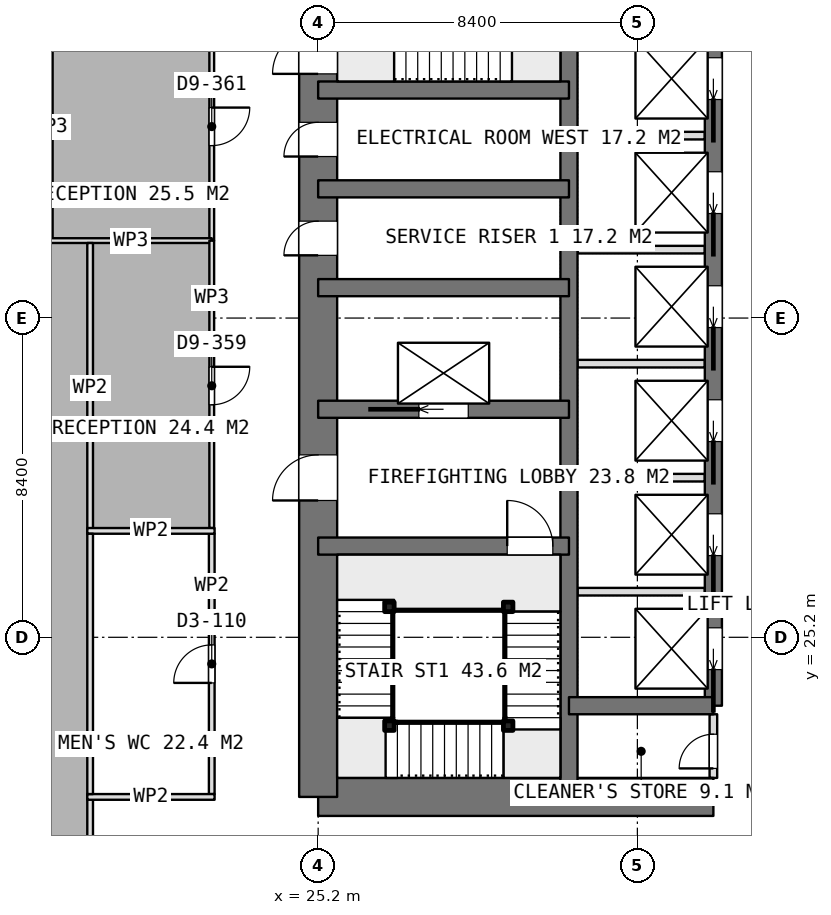
"""IFC4 building model, lengths in metres.
Left out: names, types, materials, properties, quantities, classifications, styles, units other than length and angle.
Written with IfcOpenShell. Run it as: python <this file> out.ifc"""

import sys

from ifc_helpers import new_model, si_unit, direction, frame, frame_2d, origin, origin_2d, place, context, subcontext, project, spatial, rectangle, extrude, element, fill, save


model = new_model("IFC4")
c1 = context("Model", 3, precision=1e-05, world=origin(), true_north=direction((0.0, 1.0)))
c2 = subcontext(c1, "Body", "Model", "MODEL_VIEW")
j1 = project(units=[si_unit("LENGTHUNIT", "METRE"), si_unit("PLANEANGLEUNIT", "RADIAN")], contexts=[c1])
p1 = place(None, origin())
s1 = spatial("IfcSite", under=j1, at=p1, CompositionType="ELEMENT")
p2 = place(p1, origin())
s2 = spatial("IfcBuilding", under=s1, at=p2, CompositionType="ELEMENT")
p3 = place(p2, frame((0.0, 0.0, 106.55)))
s3 = spatial("IfcBuildingStorey", under=s2, at=p3, CompositionType="ELEMENT", Elevation=106.55)
p4 = place(p3, frame((25.2, 21.0, 0.0), z_axis=(0.0, 0.0, 1.0), x_axis=(1.0, 0.0, 0.0)))
e1 = element("IfcWall", 1, at=p4, inside=s3, PredefinedType="SHEAR", context=c2, shape_type="SweptSolid", body=[
    extrude(rectangle(XDim=10.4, YDim=1.0, at=frame_2d((5.2, 0.0))), origin(), (0.0, 0.0, 1.0), 3.75),
])
p5 = place(p3, frame((25.2, 21.0, 0.0), z_axis=(0.0, 0.0, 1.0), x_axis=(0.0, 1.0, 0.0)))
e2 = element("IfcWall", 2, at=p5, inside=s3, PredefinedType="SHEAR", context=c2, shape_type="SweptSolid", body=[
    extrude(rectangle(XDim=25.2, YDim=1.0, at=frame_2d((12.6, 0.0))), origin(), (0.0, 0.0, 1.0), 3.75),
])
p6 = place(p5, frame((7.8, 0.0, 0.0)))
e3 = element("IfcOpeningElement", 3, at=p6, cuts=e2, PredefinedType="OPENING", context=c2, shape_type="SweptSolid", body=[
    extrude(rectangle(XDim=1.2, YDim=2.1, at=frame_2d((0.6, 1.05))), frame((0.0, 0.51, 0.0), z_axis=(0.0, -1.0, 0.0), x_axis=(1.0, 0.0, 0.0)), (0.0, 0.0, 1.0), 1.02),
])
p7 = place(p5, frame((14.25, 0.0, 0.0)))
e4 = element("IfcOpeningElement", 4, at=p7, cuts=e2, PredefinedType="OPENING", context=c2, shape_type="SweptSolid", body=[
    extrude(rectangle(XDim=0.9, YDim=2.1, at=frame_2d((0.45, 1.05))), frame((0.0, 0.51, 0.0), z_axis=(0.0, -1.0, 0.0), x_axis=(1.0, 0.0, 0.0)), (0.0, 0.0, 1.0), 1.02),
])
p8 = place(p5, frame((16.85, 0.0, 0.0)))
e5 = element("IfcOpeningElement", 5, at=p8, cuts=e2, PredefinedType="OPENING", context=c2, shape_type="SweptSolid", body=[
    extrude(rectangle(XDim=0.9, YDim=2.1, at=frame_2d((0.45, 1.05))), frame((0.0, 0.51, 0.0), z_axis=(0.0, -1.0, 0.0), x_axis=(1.0, 0.0, 0.0)), (0.0, 0.0, 1.0), 1.02),
])
p9 = place(p5, frame((19.025, 0.0, 0.0)))
e6 = element("IfcOpeningElement", 6, at=p9, cuts=e2, PredefinedType="OPENING", context=c2, shape_type="SweptSolid", body=[
    extrude(rectangle(XDim=1.2, YDim=2.1, at=frame_2d((0.6, 1.05))), frame((0.0, 0.51, 0.0), z_axis=(0.0, -1.0, 0.0), x_axis=(1.0, 0.0, 0.0)), (0.0, 0.0, 1.0), 1.02),
])
p10 = place(p3, frame((31.8, 21.0, 0.0), z_axis=(0.0, 0.0, 1.0), x_axis=(0.0, 1.0, 0.0)))
e7 = element("IfcWall", 7, at=p10, inside=s3, PredefinedType="SHEAR", context=c2, shape_type="SweptSolid", body=[
    extrude(rectangle(XDim=25.2, YDim=0.45, at=frame_2d((12.6, 0.0))), origin(), (0.0, 0.0, 1.0), 3.75),
])
p11 = place(p3, frame((35.6, 23.4, 0.0), z_axis=(0.0, 0.0, 1.0), x_axis=(0.0, 1.0, 0.0)))
e8 = element("IfcWall", 8, at=p11, inside=s3, PredefinedType="SHEAR", context=c2, shape_type="SweptSolid", body=[
    extrude(rectangle(XDim=18.0, YDim=0.45, at=frame_2d((9.0, 0.0))), origin(), (0.0, 0.0, 1.0), 3.75),
])
p12 = place(p11, frame((0.95, 0.0, 0.0)))
e9 = element("IfcOpeningElement", 9, at=p12, cuts=e8, PredefinedType="OPENING", context=c2, shape_type="SweptSolid", body=[
    extrude(rectangle(XDim=1.1, YDim=2.1, at=frame_2d((0.55, 1.05))), frame((0.0, 0.235, 0.0), z_axis=(0.0, -1.0, 0.0), x_axis=(1.0, 0.0, 0.0)), (0.0, 0.0, 1.0), 0.47),
])
p13 = place(p11, frame((3.95, 0.0, 0.0)))
e10 = element("IfcOpeningElement", 10, at=p13, cuts=e8, PredefinedType="OPENING", context=c2, shape_type="SweptSolid", body=[
    extrude(rectangle(XDim=1.1, YDim=2.1, at=frame_2d((0.55, 1.05))), frame((0.0, 0.235, 0.0), z_axis=(0.0, -1.0, 0.0), x_axis=(1.0, 0.0, 0.0)), (0.0, 0.0, 1.0), 0.47),
])
p14 = place(p11, frame((6.95, 0.0, 0.0)))
e11 = element("IfcOpeningElement", 11, at=p14, cuts=e8, PredefinedType="OPENING", context=c2, shape_type="SweptSolid", body=[
    extrude(rectangle(XDim=1.1, YDim=2.1, at=frame_2d((0.55, 1.05))), frame((0.0, 0.235, 0.0), z_axis=(0.0, -1.0, 0.0), x_axis=(1.0, 0.0, 0.0)), (0.0, 0.0, 1.0), 0.47),
])
p15 = place(p11, frame((9.95, 0.0, 0.0)))
e12 = element("IfcOpeningElement", 12, at=p15, cuts=e8, PredefinedType="OPENING", context=c2, shape_type="SweptSolid", body=[
    extrude(rectangle(XDim=1.1, YDim=2.1, at=frame_2d((0.55, 1.05))), frame((0.0, 0.235, 0.0), z_axis=(0.0, -1.0, 0.0), x_axis=(1.0, 0.0, 0.0)), (0.0, 0.0, 1.0), 0.47),
])
p16 = place(p11, frame((12.95, 0.0, 0.0)))
e13 = element("IfcOpeningElement", 13, at=p16, cuts=e8, PredefinedType="OPENING", context=c2, shape_type="SweptSolid", body=[
    extrude(rectangle(XDim=1.1, YDim=2.1, at=frame_2d((0.55, 1.05))), frame((0.0, 0.235, 0.0), z_axis=(0.0, -1.0, 0.0), x_axis=(1.0, 0.0, 0.0)), (0.0, 0.0, 1.0), 0.47),
])
p17 = place(p11, frame((15.95, 0.0, 0.0)))
e14 = element("IfcOpeningElement", 14, at=p17, cuts=e8, PredefinedType="OPENING", context=c2, shape_type="SweptSolid", body=[
    extrude(rectangle(XDim=1.1, YDim=2.1, at=frame_2d((0.55, 1.05))), frame((0.0, 0.235, 0.0), z_axis=(0.0, -1.0, 0.0), x_axis=(1.0, 0.0, 0.0)), (0.0, 0.0, 1.0), 0.47),
])
p18 = place(p3, frame((31.8, 23.4, 0.0), z_axis=(0.0, 0.0, 1.0), x_axis=(1.0, 0.0, 0.0)))
e15 = element("IfcWall", 15, at=p18, inside=s3, PredefinedType="SHEAR", context=c2, shape_type="SweptSolid", body=[
    extrude(rectangle(XDim=3.8, YDim=0.45, at=frame_2d((1.9, 0.0))), origin(), (0.0, 0.0, 1.0), 3.75),
])
p19 = place(p3, frame((25.2, 27.6, 0.0), z_axis=(0.0, 0.0, 1.0), x_axis=(1.0, 0.0, 0.0)))
e16 = element("IfcWall", 16, at=p19, inside=s3, PredefinedType="SHEAR", context=c2, shape_type="SweptSolid", body=[
    extrude(rectangle(XDim=6.6, YDim=0.45, at=frame_2d((3.3, 0.0))), origin(), (0.0, 0.0, 1.0), 3.75),
])
p20 = place(p19, frame((4.975, 0.0, 0.0)))
e17 = element("IfcOpeningElement", 17, at=p20, cuts=e16, PredefinedType="OPENING", context=c2, shape_type="SweptSolid", body=[
    extrude(rectangle(XDim=1.2, YDim=2.1, at=frame_2d((0.6, 1.05))), frame((0.0, 0.235, 0.0), z_axis=(0.0, -1.0, 0.0), x_axis=(1.0, 0.0, 0.0)), (0.0, 0.0, 1.0), 0.47),
])
p21 = place(p3, frame((25.2, 31.2, 0.0), z_axis=(0.0, 0.0, 1.0), x_axis=(1.0, 0.0, 0.0)))
e18 = element("IfcWall", 18, at=p21, inside=s3, PredefinedType="SHEAR", context=c2, shape_type="SweptSolid", body=[
    extrude(rectangle(XDim=6.6, YDim=0.45, at=frame_2d((3.3, 0.0))), origin(), (0.0, 0.0, 1.0), 3.75),
])
p22 = place(p21, frame((2.65, 0.0, 0.0)))
e19 = element("IfcOpeningElement", 19, at=p22, cuts=e18, PredefinedType="OPENING", context=c2, shape_type="SweptSolid", body=[
    extrude(rectangle(XDim=1.3, YDim=2.1, at=frame_2d((0.65, 1.05))), frame((0.0, 0.235, 0.0), z_axis=(0.0, -1.0, 0.0), x_axis=(1.0, 0.0, 0.0)), (0.0, 0.0, 1.0), 0.47),
])
for number, where, z_axis, x_axis in (
    (20, (25.2, 34.4, 0.0), (0.0, 0.0, 1.0), (1.0, 0.0, 0.0)),
    (21, (25.2, 37.0, 0.0), (0.0, 0.0, 1.0), (1.0, 0.0, 0.0)),
    (22, (25.2, 39.6, 0.0), (0.0, 0.0, 1.0), (1.0, 0.0, 0.0)),
):
    element("IfcWall", number, at=place(p3, frame(where, z_axis=z_axis, x_axis=x_axis)), inside=s3, PredefinedType="SHEAR", context=c2, shape_type="SweptSolid", body=[
        extrude(rectangle(XDim=6.6, YDim=0.45, at=frame_2d((3.3, 0.0))), origin(), (0.0, 0.0, 1.0), 3.75),
    ])
for number, where, z_axis, x_axis in (
    (23, (32.025, 26.4, 0.0), (0.0, 0.0, 1.0), (1.0, 0.0, 0.0)),
    (24, (32.025, 29.4, 0.0), (0.0, 0.0, 1.0), (1.0, 0.0, 0.0)),
    (25, (32.025, 32.4, 0.0), (0.0, 0.0, 1.0), (1.0, 0.0, 0.0)),
    (26, (32.025, 35.4, 0.0), (0.0, 0.0, 1.0), (1.0, 0.0, 0.0)),
    (27, (32.025, 38.4, 0.0), (0.0, 0.0, 1.0), (1.0, 0.0, 0.0)),
):
    element("IfcWall", number, at=place(p3, frame(where, z_axis=z_axis, x_axis=x_axis)), inside=s3, PredefinedType="PARTITIONING", context=c2, shape_type="SweptSolid", body=[
        extrude(rectangle(XDim=3.35, YDim=0.2, at=frame_2d((1.675, 0.0))), origin(), (0.0, 0.0, 1.0), 3.5),
    ])
p23 = place(p3, frame((35.6, 21.5, 0.0), z_axis=(0.0, 0.0, 1.0), x_axis=(0.0, 1.0, 0.0)))
e28 = element("IfcWall", 28, at=p23, inside=s3, PredefinedType="PARTITIONING", context=c2, shape_type="SweptSolid", body=[
    extrude(rectangle(XDim=1.675, YDim=0.2, at=frame_2d((0.837, 0.0))), origin(), (0.0, 0.0, 1.0), 3.5),
])
p24 = place(p23, frame((0.25, 0.0, 0.0)))
e29 = element("IfcOpeningElement", 29, at=p24, cuts=e28, PredefinedType="OPENING", context=c2, shape_type="SweptSolid", body=[
    extrude(rectangle(XDim=0.9, YDim=2.1, at=frame_2d((0.45, 1.05))), frame((0.0, 0.11, 0.0), z_axis=(0.0, -1.0, 0.0), x_axis=(1.0, 0.0, 0.0)), (0.0, 0.0, 1.0), 0.22),
])
for number, where, z_axis, x_axis in (
    (30, (19.125, 21.0, 0.0), (0.0, 0.0, 1.0), (1.0, 0.0, 0.0)),
    (31, (19.125, 28.0, 0.0), (0.0, 0.0, 1.0), (1.0, 0.0, 0.0)),
):
    element("IfcWall", number, at=place(p3, frame(where, z_axis=z_axis, x_axis=x_axis)), inside=s3, PredefinedType="PARTITIONING", context=c2, shape_type="SweptSolid", body=[
        extrude(rectangle(XDim=3.35, YDim=0.15, at=frame_2d((1.675, 0.0))), origin(), (0.0, 0.0, 1.0), 3.5),
    ])
p25 = place(p3, frame((19.2, 21.075, 0.0), z_axis=(0.0, 0.0, 1.0), x_axis=(0.0, 1.0, 0.0)))
e32 = element("IfcWall", 32, at=p25, inside=s3, PredefinedType="PARTITIONING", context=c2, shape_type="SweptSolid", body=[
    extrude(rectangle(XDim=6.85, YDim=0.15, at=frame_2d((3.425, 0.0))), origin(), (0.0, 0.0, 1.0), 3.5),
])
p26 = place(p3, frame((22.4, 21.075, 0.0), z_axis=(0.0, 0.0, 1.0), x_axis=(0.0, 1.0, 0.0)))
e33 = element("IfcWall", 33, at=p26, inside=s3, PredefinedType="PARTITIONING", context=c2, shape_type="SweptSolid", body=[
    extrude(rectangle(XDim=6.85, YDim=0.15, at=frame_2d((3.425, 0.0))), origin(), (0.0, 0.0, 1.0), 3.5),
])
p27 = place(p26, frame((2.925, 0.0, 0.0)))
e34 = element("IfcOpeningElement", 34, at=p27, cuts=e33, PredefinedType="OPENING", context=c2, shape_type="SweptSolid", body=[
    extrude(rectangle(XDim=1.0, YDim=2.1, at=frame_2d((0.5, 1.05))), frame((0.0, 0.085, 0.0), z_axis=(0.0, -1.0, 0.0), x_axis=(1.0, 0.0, 0.0)), (0.0, 0.0, 1.0), 0.17),
])
p28 = place(p3, frame((18.15, 35.638, 0.0), z_axis=(0.0, 0.0, 1.0), x_axis=(0.0, 1.0, 0.0)))
e35 = element("IfcWall", 35, at=p28, inside=s3, PredefinedType="PARTITIONING", context=c2, shape_type="SweptSolid", body=[
    extrude(rectangle(XDim=5.999, YDim=0.125, at=frame_2d((3.0, 0.0))), origin(), (0.0, 0.0, 1.0), 3.5),
])
p29 = place(p3, frame((22.4, 41.637, 0.0), z_axis=(0.0, 0.0, 1.0), x_axis=(0.0, -1.0, 0.0)))
e36 = element("IfcWall", 36, at=p29, inside=s3, PredefinedType="PARTITIONING", context=c2, shape_type="SweptSolid", body=[
    extrude(rectangle(XDim=5.999, YDim=0.125, at=frame_2d((3.0, 0.0))), origin(), (0.0, 0.0, 1.0), 3.5),
])
p30 = place(p29, frame((2.499, 0.0, 0.0)))
e37 = element("IfcOpeningElement", 37, at=p30, cuts=e36, PredefinedType="OPENING", context=c2, shape_type="SweptSolid", body=[
    extrude(rectangle(XDim=1.0, YDim=2.1, at=frame_2d((0.5, 1.05))), frame((0.0, 0.073, 0.0), z_axis=(0.0, -1.0, 0.0), x_axis=(1.0, 0.0, 0.0)), (0.0, 0.0, 1.0), 0.145),
])
p31 = place(p3, frame((22.4, 35.638, 0.0), z_axis=(0.0, 0.0, 1.0), x_axis=(-1.0, 0.0, 0.0)))
e38 = element("IfcWall", 38, at=p31, inside=s3, PredefinedType="PARTITIONING", context=c2, shape_type="SweptSolid", body=[
    extrude(rectangle(XDim=4.25, YDim=0.125, at=frame_2d((2.125, 0.0))), origin(), (0.0, 0.0, 1.0), 3.5),
])
p32 = place(p3, frame((19.2, 35.575, 0.0), z_axis=(0.0, 0.0, 1.0), x_axis=(0.0, -1.0, 0.0)))
e39 = element("IfcWall", 39, at=p32, inside=s3, PredefinedType="PARTITIONING", context=c2, shape_type="SweptSolid", body=[
    extrude(rectangle(XDim=7.65, YDim=0.15, at=frame_2d((3.825, 0.0))), origin(), (0.0, 0.0, 1.0), 3.5),
])
p33 = place(p3, frame((19.2, 21.075, 0.0), z_axis=(0.0, 0.0, 1.0), x_axis=(0.0, -1.0, 0.0)))
e40 = element("IfcWall", 40, at=p33, inside=s3, PredefinedType="PARTITIONING", context=c2, shape_type="SweptSolid", body=[
    extrude(rectangle(XDim=1.636, YDim=0.15, at=frame_2d((0.818, 0.0))), origin(), (0.0, 0.0, 1.0), 3.5),
])
p34 = place(p3, frame((22.4, 35.637, 0.0), z_axis=(0.0, 0.0, 1.0), x_axis=(0.0, -1.0, 0.0)))
e41 = element("IfcWall", 41, at=p34, inside=s3, PredefinedType="PARTITIONING", context=c2, shape_type="SweptSolid", body=[
    extrude(rectangle(XDim=7.562, YDim=0.125, at=frame_2d((3.781, 0.0))), origin(), (0.0, 0.0, 1.0), 3.5),
])
p35 = place(p34, frame((3.319, 0.0, 0.0)))
e42 = element("IfcOpeningElement", 42, at=p35, cuts=e41, PredefinedType="OPENING", context=c2, shape_type="SweptSolid", body=[
    extrude(rectangle(XDim=1.0, YDim=2.1, at=frame_2d((0.5, 1.05))), frame((0.0, 0.073, 0.0), z_axis=(0.0, -1.0, 0.0), x_axis=(1.0, 0.0, 0.0)), (0.0, 0.0, 1.0), 0.145),
])
for number, where, z_axis, x_axis in (
    (43, (30.2, 26.0, 0.0), (0.0, 0.0, 1.0), (1.0, 0.0, 0.0)),
    (44, (30.2, 22.875, 0.0), (0.0, 0.0, 1.0), (1.0, 0.0, 0.0)),
    (45, (27.075, 22.875, 0.0), (0.0, 0.0, 1.0), (1.0, 0.0, 0.0)),
    (46, (27.075, 26.0, 0.0), (0.0, 0.0, 1.0), (1.0, 0.0, 0.0)),
):
    element("IfcColumn", number, at=place(p3, frame(where, z_axis=z_axis, x_axis=x_axis)), inside=s3, PredefinedType="COLUMN", context=c2, shape_type="SweptSolid", body=[
        extrude(rectangle(XDim=0.25, YDim=0.25, at=origin_2d()), origin(), (0.0, 0.0, 1.0), 3.75),
    ])
p36 = place(p6, origin())
e47 = element("IfcDoor", 47, at=p36, inside=s3, OperationType="SINGLE_SWING_LEFT", PredefinedType="DOOR", context=c2, shape_type="SweptSolid", body=[
    extrude(rectangle(XDim=1.2, YDim=2.1, at=frame_2d((0.6, 1.05))), frame((0.0, 0.025, 0.0), z_axis=(0.0, -1.0, 0.0), x_axis=(1.0, 0.0, 0.0)), (0.0, 0.0, 1.0), 0.05),
])
fill(e3, e47)
p37 = place(p7, origin())
e48 = element("IfcDoor", 48, at=p37, inside=s3, OperationType="SINGLE_SWING_LEFT", PredefinedType="DOOR", context=c2, shape_type="SweptSolid", body=[
    extrude(rectangle(XDim=0.9, YDim=2.1, at=frame_2d((0.45, 1.05))), frame((0.0, 0.025, 0.0), z_axis=(0.0, -1.0, 0.0), x_axis=(1.0, 0.0, 0.0)), (0.0, 0.0, 1.0), 0.05),
])
fill(e4, e48)
p38 = place(p8, origin())
e49 = element("IfcDoor", 49, at=p38, inside=s3, OperationType="SINGLE_SWING_LEFT", PredefinedType="DOOR", context=c2, shape_type="SweptSolid", body=[
    extrude(rectangle(XDim=0.9, YDim=2.1, at=frame_2d((0.45, 1.05))), frame((0.0, 0.025, 0.0), z_axis=(0.0, -1.0, 0.0), x_axis=(1.0, 0.0, 0.0)), (0.0, 0.0, 1.0), 0.05),
])
fill(e5, e49)
p39 = place(p24, origin())
e50 = element("IfcDoor", 50, at=p39, inside=s3, OperationType="SINGLE_SWING_LEFT", PredefinedType="DOOR", context=c2, shape_type="SweptSolid", body=[
    extrude(rectangle(XDim=0.9, YDim=2.1, at=frame_2d((0.45, 1.05))), frame((0.0, 0.025, 0.0), z_axis=(0.0, -1.0, 0.0), x_axis=(1.0, 0.0, 0.0)), (0.0, 0.0, 1.0), 0.05),
])
fill(e29, e50)
p40 = place(p12, origin())
e51 = element("IfcDoor", 51, at=p40, inside=s3, OperationType="SLIDING_TO_LEFT", PredefinedType="USERDEFINED", context=c2, shape_type="SweptSolid", body=[
    extrude(rectangle(XDim=1.1, YDim=2.1, at=frame_2d((0.55, 1.05))), frame((0.0, 0.025, 0.0), z_axis=(0.0, -1.0, 0.0), x_axis=(1.0, 0.0, 0.0)), (0.0, 0.0, 1.0), 0.05),
])
fill(e9, e51)
p41 = place(p13, origin())
e52 = element("IfcDoor", 52, at=p41, inside=s3, OperationType="SLIDING_TO_LEFT", PredefinedType="USERDEFINED", context=c2, shape_type="SweptSolid", body=[
    extrude(rectangle(XDim=1.1, YDim=2.1, at=frame_2d((0.55, 1.05))), frame((0.0, 0.025, 0.0), z_axis=(0.0, -1.0, 0.0), x_axis=(1.0, 0.0, 0.0)), (0.0, 0.0, 1.0), 0.05),
])
fill(e10, e52)
p42 = place(p14, origin())
e53 = element("IfcDoor", 53, at=p42, inside=s3, OperationType="SLIDING_TO_LEFT", PredefinedType="USERDEFINED", context=c2, shape_type="SweptSolid", body=[
    extrude(rectangle(XDim=1.1, YDim=2.1, at=frame_2d((0.55, 1.05))), frame((0.0, 0.025, 0.0), z_axis=(0.0, -1.0, 0.0), x_axis=(1.0, 0.0, 0.0)), (0.0, 0.0, 1.0), 0.05),
])
fill(e11, e53)
p43 = place(p15, origin())
e54 = element("IfcDoor", 54, at=p43, inside=s3, OperationType="SLIDING_TO_LEFT", PredefinedType="USERDEFINED", context=c2, shape_type="SweptSolid", body=[
    extrude(rectangle(XDim=1.1, YDim=2.1, at=frame_2d((0.55, 1.05))), frame((0.0, 0.025, 0.0), z_axis=(0.0, -1.0, 0.0), x_axis=(1.0, 0.0, 0.0)), (0.0, 0.0, 1.0), 0.05),
])
fill(e12, e54)
p44 = place(p16, origin())
e55 = element("IfcDoor", 55, at=p44, inside=s3, OperationType="SLIDING_TO_LEFT", PredefinedType="USERDEFINED", context=c2, shape_type="SweptSolid", body=[
    extrude(rectangle(XDim=1.1, YDim=2.1, at=frame_2d((0.55, 1.05))), frame((0.0, 0.025, 0.0), z_axis=(0.0, -1.0, 0.0), x_axis=(1.0, 0.0, 0.0)), (0.0, 0.0, 1.0), 0.05),
])
fill(e13, e55)
p45 = place(p17, origin())
e56 = element("IfcDoor", 56, at=p45, inside=s3, OperationType="SLIDING_TO_LEFT", PredefinedType="USERDEFINED", context=c2, shape_type="SweptSolid", body=[
    extrude(rectangle(XDim=1.1, YDim=2.1, at=frame_2d((0.55, 1.05))), frame((0.0, 0.025, 0.0), z_axis=(0.0, -1.0, 0.0), x_axis=(1.0, 0.0, 0.0)), (0.0, 0.0, 1.0), 0.05),
])
fill(e14, e56)
p46 = place(p22, origin())
e57 = element("IfcDoor", 57, at=p46, inside=s3, OperationType="SLIDING_TO_LEFT", PredefinedType="USERDEFINED", context=c2, shape_type="SweptSolid", body=[
    extrude(rectangle(XDim=1.3, YDim=2.1, at=frame_2d((0.65, 1.05))), frame((0.0, 0.025, 0.0), z_axis=(0.0, -1.0, 0.0), x_axis=(1.0, 0.0, 0.0)), (0.0, 0.0, 1.0), 0.05),
])
fill(e19, e57)
p47 = place(p27, origin())
e58 = element("IfcDoor", 58, at=p47, inside=s3, OperationType="SINGLE_SWING_LEFT", PredefinedType="DOOR", context=c2, shape_type="SweptSolid", body=[
    extrude(rectangle(XDim=1.0, YDim=2.1, at=frame_2d((0.5, 1.05))), frame((0.0, 0.025, 0.0), z_axis=(0.0, -1.0, 0.0), x_axis=(1.0, 0.0, 0.0)), (0.0, 0.0, 1.0), 0.05),
])
fill(e34, e58)
p48 = place(p30, origin())
e59 = element("IfcDoor", 59, at=p48, inside=s3, OperationType="SINGLE_SWING_LEFT", PredefinedType="DOOR", context=c2, shape_type="SweptSolid", body=[
    extrude(rectangle(XDim=1.0, YDim=2.1, at=frame_2d((0.5, 1.05))), frame((0.0, 0.025, 0.0), z_axis=(0.0, -1.0, 0.0), x_axis=(1.0, 0.0, 0.0)), (0.0, 0.0, 1.0), 0.05),
])
fill(e37, e59)
p49 = place(p35, origin())
e60 = element("IfcDoor", 60, at=p49, inside=s3, OperationType="SINGLE_SWING_LEFT", PredefinedType="DOOR", context=c2, shape_type="SweptSolid", body=[
    extrude(rectangle(XDim=1.0, YDim=2.1, at=frame_2d((0.5, 1.05))), frame((0.0, 0.025, 0.0), z_axis=(0.0, -1.0, 0.0), x_axis=(1.0, 0.0, 0.0)), (0.0, 0.0, 1.0), 0.05),
])
fill(e42, e60)
p50 = place(p20, origin())
e61 = element("IfcDoor", 61, at=p50, inside=s3, OperationType="SINGLE_SWING_RIGHT", PredefinedType="DOOR", context=c2, shape_type="SweptSolid", body=[
    extrude(rectangle(XDim=1.2, YDim=2.1, at=frame_2d((0.6, 1.05))), frame((0.0, 0.025, 0.0), z_axis=(0.0, -1.0, 0.0), x_axis=(1.0, 0.0, 0.0)), (0.0, 0.0, 1.0), 0.05),
])
fill(e17, e61)
p51 = place(p9, origin())
e62 = element("IfcDoor", 62, at=p51, inside=s3, OperationType="SINGLE_SWING_RIGHT", PredefinedType="DOOR", context=c2, shape_type="SweptSolid", body=[
    extrude(rectangle(XDim=1.2, YDim=2.1, at=frame_2d((0.6, 1.05))), frame((0.0, 0.025, 0.0), z_axis=(0.0, -1.0, 0.0), x_axis=(1.0, 0.0, 0.0)), (0.0, 0.0, 1.0), 0.05),
])
fill(e6, e62)
save(model, sys.argv[1])
